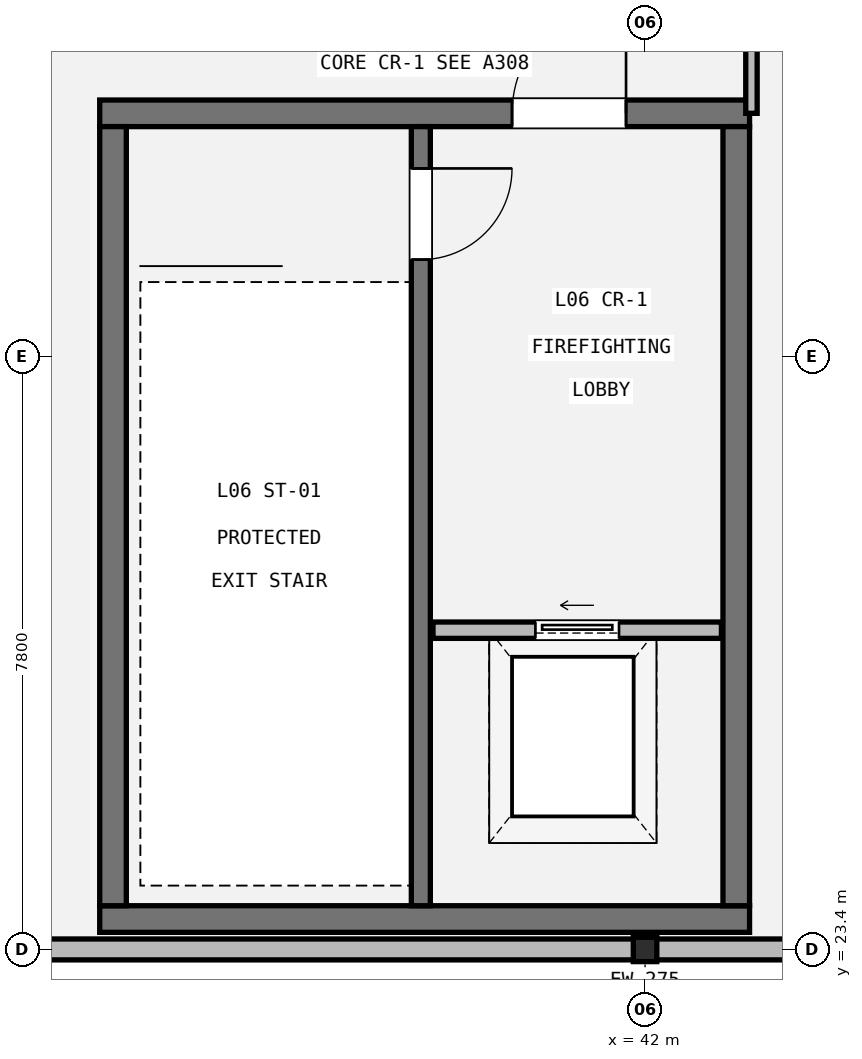
"""IFC4 building model, lengths in metres.
Left out: names, types, materials, properties, quantities, classifications, styles, units other than length and angle.
Written with IfcOpenShell. Run it as: python <this file> out.ifc"""

import sys

from ifc_helpers import new_model, si_unit, direction, frame, frame_2d, origin, origin_2d, place, context, subcontext, project, spatial, rectangle, i_section, extrude, element, fill, save


model = new_model("IFC4")
c1 = context("Model", 3, precision=1e-05, world=origin(), true_north=direction((0.0, 1.0)))
c2 = subcontext(c1, "Body", "Model", "MODEL_VIEW")
j1 = project(units=[si_unit("LENGTHUNIT", "METRE"), si_unit("PLANEANGLEUNIT", "RADIAN")], contexts=[c1])
p1 = place(None, origin())
s1 = spatial("IfcSite", under=j1, at=p1, CompositionType="ELEMENT")
p2 = place(p1, origin())
s2 = spatial("IfcBuilding", under=s1, at=p2, CompositionType="ELEMENT")
p3 = place(p2, frame((0.0, 0.0, 27.6)))
s3 = spatial("IfcBuildingStorey", under=s2, at=p3, CompositionType="ELEMENT", Elevation=27.6)
p4 = place(p3, frame((42.0, 23.4, 0.0), z_axis=(0.0, 0.0, 1.0), x_axis=(1.0, 0.0, 0.0)))
e1 = element("IfcColumn", 1, at=p4, inside=s3, PredefinedType="COLUMN", context=c2, shape_type="SweptSolid", body=[
    extrude(i_section(OverallWidth=0.309, OverallDepth=0.321, WebThickness=0.014, FlangeThickness=0.022, FilletRadius=0.015, at=origin_2d()), origin(), (0.0, 0.0, 1.0), 4.8),
])
p5 = place(p3, frame((50.4, 23.4, 0.0), z_axis=(0.0, 0.0, 1.0), x_axis=(-1.0, 0.0, 0.0)))
e2 = element("IfcWall", 2, at=p5, inside=s3, PredefinedType="STANDARD", context=c2, shape_type="SweptSolid", body=[
    extrude(rectangle(XDim=16.8, YDim=0.275, at=frame_2d((8.4, 0.0))), origin(), (0.0, 0.0, 1.0), 4.552),
])
p6 = place(p3, frame((43.375, 23.8, 0.0), z_axis=(0.0, 0.0, 1.0), x_axis=(-1.0, 0.0, 0.0)))
e3 = element("IfcWall", 3, at=p6, inside=s3, PredefinedType="SHEAR", context=c2, shape_type="SweptSolid", body=[
    extrude(rectangle(XDim=8.55, YDim=0.35, at=frame_2d((4.275, 0.0))), origin(), (0.0, 0.0, 1.0), 4.62),
])
p7 = place(p3, frame((34.825, 34.4, 0.0), z_axis=(0.0, 0.0, 1.0), x_axis=(1.0, 0.0, 0.0)))
e4 = element("IfcWall", 4, at=p7, inside=s3, PredefinedType="SHEAR", context=c2, shape_type="SweptSolid", body=[
    extrude(rectangle(XDim=8.55, YDim=0.35, at=frame_2d((4.275, 0.0))), origin(), (0.0, 0.0, 1.0), 4.62),
])
p8 = place(p7, frame((5.425, 0.0, 0.0)))
e5 = element("IfcOpeningElement", 5, at=p8, cuts=e4, PredefinedType="OPENING", context=c2, shape_type="SweptSolid", body=[
    extrude(rectangle(XDim=1.5, YDim=2.15, at=frame_2d((0.75, 1.075))), frame((0.0, 0.185, 0.0), z_axis=(0.0, -1.0, 0.0), x_axis=(1.0, 0.0, 0.0)), (0.0, 0.0, 1.0), 0.37),
])
for number, where, z_axis, x_axis in (
    (6, (35.0, 23.975, 0.0), (0.0, 0.0, 1.0), (0.0, 1.0, 0.0)),
    (7, (43.2, 34.225, 0.0), (0.0, 0.0, 1.0), (0.0, -1.0, 0.0)),
):
    element("IfcWall", number, at=place(p3, frame(where, z_axis=z_axis, x_axis=x_axis)), inside=s3, PredefinedType="SHEAR", context=c2, shape_type="SweptSolid", body=[
        extrude(rectangle(XDim=10.25, YDim=0.35, at=frame_2d((5.125, 0.0))), origin(), (0.0, 0.0, 1.0), 4.62),
    ])
p9 = place(p3, frame((39.05, 34.225, 0.0), z_axis=(0.0, 0.0, 1.0), x_axis=(0.0, -1.0, 0.0)))
e8 = element("IfcWall", 8, at=p9, inside=s3, PredefinedType="SHEAR", context=c2, shape_type="SweptSolid", body=[
    extrude(rectangle(XDim=10.25, YDim=0.25, at=frame_2d((5.125, 0.0))), origin(), (0.0, 0.0, 1.0), 4.62),
])
p10 = place(p9, frame((0.55, 0.0, 0.0)))
e9 = element("IfcOpeningElement", 9, at=p10, cuts=e8, PredefinedType="OPENING", context=c2, shape_type="SweptSolid", body=[
    extrude(rectangle(XDim=1.2, YDim=2.15, at=frame_2d((0.6, 1.075))), frame((0.0, 0.135, 0.0), z_axis=(0.0, -1.0, 0.0), x_axis=(1.0, 0.0, 0.0)), (0.0, 0.0, 1.0), 0.27),
])
p11 = place(p3, frame((39.21, 27.6, 0.0), z_axis=(0.0, 0.0, 1.0), x_axis=(1.0, 0.0, 0.0)))
e10 = element("IfcWall", 10, at=p11, inside=s3, PredefinedType="STANDARD", context=c2, shape_type="SweptSolid", body=[
    extrude(rectangle(XDim=3.795, YDim=0.215, at=frame_2d((1.897, 0.0))), origin(), (0.0, 0.0, 1.0), 4.612),
])
p12 = place(p11, frame((1.347, 0.0, 0.0)))
e11 = element("IfcOpeningElement", 11, at=p12, cuts=e10, PredefinedType="OPENING", context=c2, shape_type="SweptSolid", body=[
    extrude(rectangle(XDim=1.1, YDim=2.2, at=frame_2d((0.55, 1.1))), frame((0.0, 0.117, 0.0), z_axis=(0.0, -1.0, 0.0), x_axis=(1.0, 0.0, 0.0)), (0.0, 0.0, 1.0), 0.235),
])
p13 = place(p3, frame((43.4, 34.4, 0.0), z_axis=(0.0, 0.0, 1.0), x_axis=(0.0, 1.0, 0.0)))
e12 = element("IfcWall", 12, at=p13, inside=s3, PredefinedType="PARTITIONING", context=c2, shape_type="SweptSolid", body=[
    extrude(rectangle(XDim=20.2, YDim=0.15, at=frame_2d((10.1, 0.0))), origin(), (0.0, 0.0, 1.0), 4.552),
])
p14 = place(p13, frame((5.73, 0.0, 0.0)))
e13 = element("IfcOpeningElement", 13, at=p14, cuts=e12, PredefinedType="OPENING", context=c2, shape_type="SweptSolid", body=[
    extrude(rectangle(XDim=1.1, YDim=2.15, at=frame_2d((0.55, 1.075))), frame((0.0, 0.085, 0.0), z_axis=(0.0, -1.0, 0.0), x_axis=(1.0, 0.0, 0.0)), (0.0, 0.0, 1.0), 0.17),
])
p15 = place(p13, frame((15.793, 0.0, 0.0)))
e14 = element("IfcOpeningElement", 14, at=p15, cuts=e12, PredefinedType="OPENING", context=c2, shape_type="SweptSolid", body=[
    extrude(rectangle(XDim=0.94, YDim=2.1, at=frame_2d((0.47, 1.05))), frame((0.0, 0.085, 0.0), z_axis=(0.0, -1.0, 0.0), x_axis=(1.0, 0.0, 0.0)), (0.0, 0.0, 1.0), 0.17),
])
p16 = place(p10, origin())
e15 = element("IfcDoor", 15, at=p16, inside=s3, OperationType="SINGLE_SWING_LEFT", PredefinedType="DOOR", context=c2, shape_type="SweptSolid", body=[
    extrude(rectangle(XDim=1.2, YDim=2.15, at=frame_2d((0.6, 1.075))), frame((0.0, 0.025, 0.0), z_axis=(0.0, -1.0, 0.0), x_axis=(1.0, 0.0, 0.0)), (0.0, 0.0, 1.0), 0.05),
])
fill(e9, e15)
p17 = place(p8, origin())
e16 = element("IfcDoor", 16, at=p17, inside=s3, OperationType="SINGLE_SWING_RIGHT", PredefinedType="DOOR", context=c2, shape_type="SweptSolid", body=[
    extrude(rectangle(XDim=1.5, YDim=2.15, at=frame_2d((0.75, 1.075))), frame((0.0, 0.025, 0.0), z_axis=(0.0, -1.0, 0.0), x_axis=(1.0, 0.0, 0.0)), (0.0, 0.0, 1.0), 0.05),
])
fill(e5, e16)
p18 = place(p12, origin())
e17 = element("IfcDoor", 17, at=p18, inside=s3, OperationType="SLIDING_TO_LEFT", PredefinedType="DOOR", context=c2, shape_type="SweptSolid", body=[
    extrude(rectangle(XDim=1.1, YDim=2.2, at=frame_2d((0.55, 1.1))), frame((0.0, 0.025, 0.0), z_axis=(0.0, -1.0, 0.0), x_axis=(1.0, 0.0, 0.0)), (0.0, 0.0, 1.0), 0.05),
])
fill(e11, e17)
save(model, sys.argv[1])
